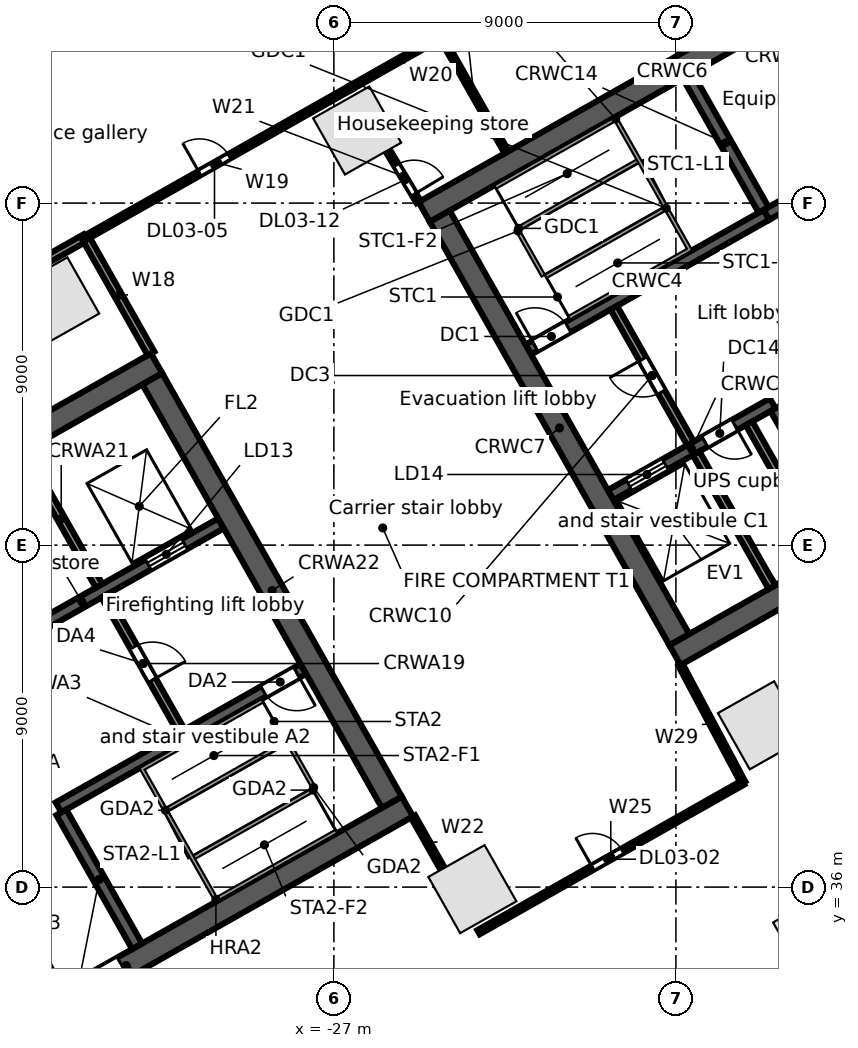
"""IFC4 building model, lengths in metres.
Left out: names, types, materials, properties, quantities, classifications, styles, units other than length and angle.
Written with IfcOpenShell. Run it as: python <this file> out.ifc"""

import sys

from ifc_helpers import new_model, si_unit, direction, frame, frame_2d, origin, origin_2d, place, context, subcontext, project, spatial, rectangle, extrude, element, fill, save


model = new_model("IFC4")
c1 = context("Model", 3, precision=1e-05, world=origin(), true_north=direction((0.0, 1.0)))
c2 = subcontext(c1, "Body", "Model", "MODEL_VIEW")
j1 = project(units=[si_unit("LENGTHUNIT", "METRE"), si_unit("PLANEANGLEUNIT", "RADIAN")], contexts=[c1])
p1 = place(None, origin())
s1 = spatial("IfcSite", under=j1, at=p1, CompositionType="ELEMENT")
p2 = place(p1, origin())
s2 = spatial("IfcBuilding", under=s1, at=p2, CompositionType="ELEMENT")
p3 = place(p2, frame((0.0, 0.0, 21.5)))
s3 = spatial("IfcBuildingStorey", under=s2, at=p3, CompositionType="ELEMENT", Elevation=21.5)
for number, where, z_axis, x_axis in (
    (1, (-26.388, 55.91, 0.0), (0.0, 0.0, 1.0), (-0.87, -0.492, 0.0)),
    (2, (-34.334, 51.414, 0.0), (0.0, 0.0, 1.0), (-0.87, -0.492, 0.0)),
    (3, (-23.356, 35.946, 0.0), (0.0, 0.0, 1.0), (0.87, 0.492, 0.0)),
    (4, (-15.736, 40.257, 0.0), (0.0, 0.0, 1.0), (0.87, 0.492, 0.0)),
):
    element("IfcColumn", number, at=place(p3, frame(where, z_axis=z_axis, x_axis=x_axis)), inside=s3, PredefinedType="COLUMN", context=c2, shape_type="SweptSolid", body=[
        extrude(rectangle(XDim=1.7, YDim=1.7, at=origin_2d()), origin(), (0.0, 0.0, 1.0), 5.0),
    ])
p4 = place(p3, frame((-14.761, 34.88, 0.0), z_axis=(0.0, 0.0, 1.0), x_axis=(0.87035569594, 0.492423560103, 0.0)))
e5 = element("IfcColumn", 5, at=p4, inside=s3, PredefinedType="COLUMN", context=c2, shape_type="SweptSolid", body=[
    extrude(rectangle(XDim=1.0, YDim=1.0, at=origin_2d()), origin(), (0.0, 0.0, 1.0), 4.68),
])
p5 = place(p3, frame((-63.707, 41.701, 0.0), z_axis=(0.0, 0.0, 1.0), x_axis=(0.870355510268, 0.492423888277, 0.0)))
e6 = element("IfcWall", 6, at=p5, inside=s3, PredefinedType="STANDARD", context=c2, shape_type="SweptSolid", body=[
    extrude(rectangle(XDim=67.903, YDim=0.3, at=frame_2d((33.952, 0.0))), origin(), (0.0, 0.0, 1.0), 4.68),
])
p6 = place(p3, frame((-39.862, 29.749, 0.0), z_axis=(0.0, 0.0, 1.0), x_axis=(0.870350116061, 0.492433422375, 0.0)))
e7 = element("IfcWall", 7, at=p6, inside=s3, PredefinedType="SOLIDWALL", context=c2, shape_type="SweptSolid", body=[
    extrude(rectangle(XDim=17.0, YDim=0.6, at=frame_2d((8.5, 0.0))), origin(), (0.0, 0.0, 1.0), 4.68),
])
p7 = place(p6, frame((7.2, 0.0, 0.0)))
e8 = element("IfcOpeningElement", 8, at=p7, cuts=e7, PredefinedType="OPENING", context=c2, shape_type="SweptSolid", body=[
    extrude(rectangle(XDim=1.2, YDim=2.1, at=frame_2d((0.6, 1.05))), frame((0.0, 0.31, 0.0), z_axis=(0.0, -1.0, 0.0), x_axis=(1.0, 0.0, 0.0)), (0.0, 0.0, 1.0), 0.62),
])
p8 = place(p3, frame((-34.245, 38.097, 0.0), z_axis=(0.0, 0.0, 1.0), x_axis=(0.870364910201, 0.492407273597, 0.0)))
e9 = element("IfcWall", 9, at=p8, inside=s3, PredefinedType="SOLIDWALL", context=c2, shape_type="SweptSolid", body=[
    extrude(rectangle(XDim=7.4, YDim=0.3, at=frame_2d((3.7, 0.0))), origin(), (0.0, 0.0, 1.0), 4.68),
])
p9 = place(p8, frame((6.2, 0.0, 0.0)))
e10 = element("IfcOpeningElement", 10, at=p9, cuts=e9, PredefinedType="OPENING", context=c2, shape_type="SweptSolid", body=[
    extrude(rectangle(XDim=1.0, YDim=2.1, at=frame_2d((0.5, 1.05))), frame((0.0, 0.16, 0.0), z_axis=(0.0, -1.0, 0.0), x_axis=(1.0, 0.0, 0.0)), (0.0, 0.0, 1.0), 0.32),
])
p10 = place(p3, frame((-37.282, 41.435, 0.0), z_axis=(0.0, 0.0, 1.0), x_axis=(0.870356516133, 0.492422110414, 0.0)))
e11 = element("IfcWall", 11, at=p10, inside=s3, PredefinedType="SOLIDWALL", context=c2, shape_type="SweptSolid", body=[
    extrude(rectangle(XDim=8.4, YDim=0.3, at=frame_2d((4.2, 0.0))), origin(), (0.0, 0.0, 1.0), 4.68),
])
p11 = place(p10, frame((6.2, 0.0, 0.0)))
e12 = element("IfcOpeningElement", 12, at=p11, cuts=e11, PredefinedType="OPENING", context=c2, shape_type="SweptSolid", body=[
    extrude(rectangle(XDim=1.1, YDim=2.1, at=frame_2d((0.55, 1.05))), frame((0.0, 0.16, 0.0), z_axis=(0.0, -1.0, 0.0), x_axis=(1.0, 0.0, 0.0)), (0.0, 0.0, 1.0), 0.32),
])
p12 = place(p10, frame((1.95, 0.0, 0.0)))
e13 = element("IfcOpeningElement", 13, at=p12, cuts=e11, PredefinedType="OPENING", context=c2, shape_type="SweptSolid", body=[
    extrude(rectangle(XDim=0.9, YDim=2.1, at=frame_2d((0.45, 1.05))), frame((0.0, 0.16, 0.0), z_axis=(0.0, -1.0, 0.0), x_axis=(1.0, 0.0, 0.0)), (0.0, 0.0, 1.0), 0.32),
])
p13 = place(p3, frame((-46.461, 41.412, 0.0), z_axis=(0.0, 0.0, 1.0), x_axis=(0.870350116061, 0.492433422375, 0.0)))
e14 = element("IfcWall", 14, at=p13, inside=s3, PredefinedType="SOLIDWALL", context=c2, shape_type="SweptSolid", body=[
    extrude(rectangle(XDim=17.0, YDim=0.6, at=frame_2d((8.5, 0.0))), origin(), (0.0, 0.0, 1.0), 4.68),
])
p14 = place(p3, frame((-36.26, 36.785, 0.0), z_axis=(0.0, 0.0, 1.0), x_axis=(0.492440575896, -0.870346068648, 0.0)))
e15 = element("IfcWall", 15, at=p14, inside=s3, PredefinedType="SOLIDWALL", context=c2, shape_type="SweptSolid", body=[
    extrude(rectangle(XDim=4.05, YDim=0.3, at=frame_2d((2.025, 0.0))), origin(), (0.0, 0.0, 1.0), 4.68),
])
p15 = place(p3, frame((-34.171, 37.967, 0.0), z_axis=(0.0, 0.0, 1.0), x_axis=(0.492394910396, -0.870371904542, 0.0)))
e16 = element("IfcWall", 16, at=p15, inside=s3, PredefinedType="SOLIDWALL", context=c2, shape_type="SweptSolid", body=[
    extrude(rectangle(XDim=4.05, YDim=0.3, at=frame_2d((2.025, 0.0))), origin(), (0.0, 0.0, 1.0), 4.68),
])
p16 = place(p3, frame((-33.031, 43.667, 0.0), z_axis=(0.0, 0.0, 1.0), x_axis=(0.492408451753, -0.87036424366, 0.0)))
e17 = element("IfcWall", 17, at=p16, inside=s3, PredefinedType="PARTITIONING", context=c2, shape_type="SweptSolid", body=[
    extrude(rectangle(XDim=4.1, YDim=0.2, at=frame_2d((2.05, 0.0))), origin(), (0.0, 0.0, 1.0), 4.68),
])
p17 = place(p16, frame((1.55, 0.0, 0.0)))
e18 = element("IfcOpeningElement", 18, at=p17, cuts=e17, PredefinedType="OPENING", context=c2, shape_type="SweptSolid", body=[
    extrude(rectangle(XDim=1.0, YDim=2.1, at=frame_2d((0.5, 1.05))), frame((0.0, 0.11, 0.0), z_axis=(0.0, -1.0, 0.0), x_axis=(1.0, 0.0, 0.0)), (0.0, 0.0, 1.0), 0.22),
])
p18 = place(p3, frame((-35.173, 47.454, 0.0), z_axis=(0.0, 0.0, 1.0), x_axis=(0.492440575896, -0.870346068648, 0.0)))
e19 = element("IfcWall", 19, at=p18, inside=s3, PredefinedType="SOLIDWALL", context=c2, shape_type="SweptSolid", body=[
    extrude(rectangle(XDim=4.05, YDim=0.2, at=frame_2d((2.025, 0.0))), origin(), (0.0, 0.0, 1.0), 4.68),
])
p19 = place(p3, frame((-31.778, 49.374, 0.0), z_axis=(0.0, 0.0, 1.0), x_axis=(0.492433046652, -0.870350328641, 0.0)))
e20 = element("IfcWall", 20, at=p19, inside=s3, PredefinedType="SOLIDWALL", context=c2, shape_type="SweptSolid", body=[
    extrude(rectangle(XDim=12.8, YDim=0.6, at=frame_2d((6.4, 0.0))), origin(), (0.0, 0.0, 1.0), 4.68),
])
p20 = place(p3, frame((-18.024, 42.104, 0.0), z_axis=(0.0, 0.0, 1.0), x_axis=(0.870360574057, 0.492414937962, 0.0)))
e21 = element("IfcWall", 21, at=p20, inside=s3, PredefinedType="SOLIDWALL", context=c2, shape_type="SweptSolid", body=[
    extrude(rectangle(XDim=15.0, YDim=0.6, at=frame_2d((7.5, 0.0))), origin(), (0.0, 0.0, 1.0), 4.68),
])
p21 = place(p20, frame((6.1, 0.0, 0.0)))
e22 = element("IfcOpeningElement", 22, at=p21, cuts=e21, PredefinedType="OPENING", context=c2, shape_type="SweptSolid", body=[
    extrude(rectangle(XDim=1.2, YDim=2.1, at=frame_2d((0.6, 1.05))), frame((0.0, 0.31, 0.0), z_axis=(0.0, -1.0, 0.0), x_axis=(1.0, 0.0, 0.0)), (0.0, 0.0, 1.0), 0.62),
])
p22 = place(p3, frame((-19.718, 46.316, 0.0), z_axis=(0.0, 0.0, 1.0), x_axis=(0.870353963862, 0.492426621528, 0.0)))
e23 = element("IfcWall", 23, at=p22, inside=s3, PredefinedType="SOLIDWALL", context=c2, shape_type="SweptSolid", body=[
    extrude(rectangle(XDim=4.9, YDim=0.3, at=frame_2d((2.45, 0.0))), origin(), (0.0, 0.0, 1.0), 4.68),
])
p23 = place(p22, frame((0.55, 0.0, 0.0)))
e24 = element("IfcOpeningElement", 24, at=p23, cuts=e23, PredefinedType="OPENING", context=c2, shape_type="SweptSolid", body=[
    extrude(rectangle(XDim=1.1, YDim=2.1, at=frame_2d((0.55, 1.05))), frame((0.0, 0.16, 0.0), z_axis=(0.0, -1.0, 0.0), x_axis=(1.0, 0.0, 0.0)), (0.0, 0.0, 1.0), 0.32),
])
p24 = place(p22, frame((2.85, 0.0, 0.0)))
e25 = element("IfcOpeningElement", 25, at=p24, cuts=e23, PredefinedType="OPENING", context=c2, shape_type="SweptSolid", body=[
    extrude(rectangle(XDim=0.9, YDim=2.1, at=frame_2d((0.45, 1.05))), frame((0.0, 0.16, 0.0), z_axis=(0.0, -1.0, 0.0), x_axis=(1.0, 0.0, 0.0)), (0.0, 0.0, 1.0), 0.32),
])
p25 = place(p3, frame((-21.885, 50.146, 0.0), z_axis=(0.0, 0.0, 1.0), x_axis=(0.870359411463, 0.492416992881, 0.0)))
e26 = element("IfcWall", 26, at=p25, inside=s3, PredefinedType="SOLIDWALL", context=c2, shape_type="SweptSolid", body=[
    extrude(rectangle(XDim=7.2, YDim=0.3, at=frame_2d((3.6, 0.0))), origin(), (0.0, 0.0, 1.0), 4.68),
])
p26 = place(p25, frame((0.2, 0.0, 0.0)))
e27 = element("IfcOpeningElement", 27, at=p26, cuts=e26, PredefinedType="OPENING", context=c2, shape_type="SweptSolid", body=[
    extrude(rectangle(XDim=1.0, YDim=2.1, at=frame_2d((0.5, 1.05))), frame((0.0, 0.16, 0.0), z_axis=(0.0, -1.0, 0.0), x_axis=(1.0, 0.0, 0.0)), (0.0, 0.0, 1.0), 0.32),
])
p27 = place(p3, frame((-15.618, 53.691, 0.0), z_axis=(0.0, 0.0, 1.0), x_axis=(0.870356769198, 0.492421663121, 0.0)))
e28 = element("IfcWall", 28, at=p27, inside=s3, PredefinedType="SOLIDWALL", context=c2, shape_type="SweptSolid", body=[
    extrude(rectangle(XDim=6.6, YDim=0.3, at=frame_2d((3.3, 0.0))), origin(), (0.0, 0.0, 1.0), 4.68),
])
p28 = place(p27, frame((1.85, 0.0, 0.0)))
e29 = element("IfcOpeningElement", 29, at=p28, cuts=e28, PredefinedType="OPENING", context=c2, shape_type="SweptSolid", body=[
    extrude(rectangle(XDim=0.9, YDim=2.1, at=frame_2d((0.45, 1.05))), frame((0.0, 0.16, 0.0), z_axis=(0.0, -1.0, 0.0), x_axis=(1.0, 0.0, 0.0)), (0.0, 0.0, 1.0), 0.32),
])
p29 = place(p27, frame((5.3, 0.0, 0.0)))
e30 = element("IfcOpeningElement", 30, at=p29, cuts=e28, PredefinedType="OPENING", context=c2, shape_type="SweptSolid", body=[
    extrude(rectangle(XDim=0.9, YDim=2.1, at=frame_2d((0.45, 1.05))), frame((0.0, 0.16, 0.0), z_axis=(0.0, -1.0, 0.0), x_axis=(1.0, 0.0, 0.0)), (0.0, 0.0, 1.0), 0.32),
])
p30 = place(p3, frame((-24.623, 53.767, 0.0), z_axis=(0.0, 0.0, 1.0), x_axis=(0.870356627484, 0.492421913601, 0.0)))
e31 = element("IfcWall", 31, at=p30, inside=s3, PredefinedType="SOLIDWALL", context=c2, shape_type="SweptSolid", body=[
    extrude(rectangle(XDim=15.0, YDim=0.6, at=frame_2d((7.5, 0.0))), origin(), (0.0, 0.0, 1.0), 4.68),
])
p31 = place(p3, frame((-24.214, 53.654, 0.0), z_axis=(0.0, 0.0, 1.0), x_axis=(0.492441221355, -0.870345703448, 0.0)))
e32 = element("IfcWall", 32, at=p31, inside=s3, PredefinedType="SOLIDWALL", context=c2, shape_type="SweptSolid", body=[
    extrude(rectangle(XDim=12.8, YDim=0.6, at=frame_2d((6.4, 0.0))), origin(), (0.0, 0.0, 1.0), 4.68),
])
p32 = place(p3, frame((-17.469, 47.417, 0.0), z_axis=(0.0, 0.0, 1.0), x_axis=(0.492440575896, -0.870346068648, 0.0)))
e33 = element("IfcWall", 33, at=p32, inside=s3, PredefinedType="SOLIDWALL", context=c2, shape_type="SweptSolid", body=[
    extrude(rectangle(XDim=4.05, YDim=0.2, at=frame_2d((2.025, 0.0))), origin(), (0.0, 0.0, 1.0), 4.68),
])
p33 = place(p3, frame((-19.635, 51.246, 0.0), z_axis=(0.0, 0.0, 1.0), x_axis=(0.492408451753, -0.87036424366, 0.0)))
e34 = element("IfcWall", 34, at=p33, inside=s3, PredefinedType="PARTITIONING", context=c2, shape_type="SweptSolid", body=[
    extrude(rectangle(XDim=4.1, YDim=0.2, at=frame_2d((2.05, 0.0))), origin(), (0.0, 0.0, 1.0), 4.68),
])
p34 = place(p33, frame((1.55, 0.0, 0.0)))
e35 = element("IfcOpeningElement", 35, at=p34, cuts=e34, PredefinedType="OPENING", context=c2, shape_type="SweptSolid", body=[
    extrude(rectangle(XDim=1.0, YDim=2.1, at=frame_2d((0.5, 1.05))), frame((0.0, 0.11, 0.0), z_axis=(0.0, -1.0, 0.0), x_axis=(1.0, 0.0, 0.0)), (0.0, 0.0, 1.0), 0.22),
])
p35 = place(p3, frame((-16.076, 48.205, 0.0), z_axis=(0.0, 0.0, 1.0), x_axis=(0.492394910396, -0.870371904542, 0.0)))
e36 = element("IfcWall", 36, at=p35, inside=s3, PredefinedType="SOLIDWALL", context=c2, shape_type="SweptSolid", body=[
    extrude(rectangle(XDim=4.05, YDim=0.2, at=frame_2d((2.025, 0.0))), origin(), (0.0, 0.0, 1.0), 4.68),
])
p36 = place(p3, frame((-15.379, 48.599, 0.0), z_axis=(0.0, 0.0, 1.0), x_axis=(0.492394910396, -0.870371904542, 0.0)))
e37 = element("IfcWall", 37, at=p36, inside=s3, PredefinedType="SOLIDWALL", context=c2, shape_type="SweptSolid", body=[
    extrude(rectangle(XDim=4.05, YDim=0.3, at=frame_2d((2.025, 0.0))), origin(), (0.0, 0.0, 1.0), 4.68),
])
p37 = place(p3, frame((-17.686, 57.347, 0.0), z_axis=(0.0, 0.0, 1.0), x_axis=(0.492420746998, -0.870357287513, 0.0)))
e38 = element("IfcWall", 38, at=p37, inside=s3, PredefinedType="SOLIDWALL", context=c2, shape_type="SweptSolid", body=[
    extrude(rectangle(XDim=4.05, YDim=0.3, at=frame_2d((2.025, 0.0))), origin(), (0.0, 0.0, 1.0), 4.68),
])
p38 = place(p3, frame((-40.934, 48.905, 0.0), z_axis=(0.0, 0.0, 1.0), x_axis=(0.870387854278, 0.492366716102, 0.0)))
e39 = element("IfcWall", 39, at=p38, inside=s3, PredefinedType="PARTITIONING", context=c2, shape_type="SweptSolid", body=[
    extrude(rectangle(XDim=8.5, YDim=0.2, at=frame_2d((4.25, 0.0))), origin(), (0.0, 0.0, 1.0), 4.054),
])
p39 = place(p3, frame((-33.536, 53.09, 0.0), z_axis=(0.0, 0.0, 1.0), x_axis=(0.492521469645, -0.870300294116, 0.0)))
e40 = element("IfcWall", 40, at=p39, inside=s3, PredefinedType="PARTITIONING", context=c2, shape_type="SweptSolid", body=[
    extrude(rectangle(XDim=3.5, YDim=0.2, at=frame_2d((1.75, 0.0))), origin(), (0.0, 0.0, 1.0), 3.96),
])
p40 = place(p3, frame((-33.536, 53.09, 0.0), z_axis=(0.0, 0.0, 1.0), x_axis=(0.870327439455, 0.492473499928, 0.0)))
e41 = element("IfcWall", 41, at=p40, inside=s3, PredefinedType="PARTITIONING", context=c2, shape_type="SweptSolid", body=[
    extrude(rectangle(XDim=8.0, YDim=0.125, at=frame_2d((4.0, 0.0))), origin(), (0.0, 0.0, 1.0), 3.742),
])
p41 = place(p40, frame((3.45, 0.0, 0.0)))
e42 = element("IfcOpeningElement", 42, at=p41, cuts=e41, PredefinedType="OPENING", context=c2, shape_type="SweptSolid", body=[
    extrude(rectangle(XDim=0.9, YDim=2.1, at=frame_2d((0.45, 1.05))), frame((0.0, 0.073, 0.0), z_axis=(0.0, -1.0, 0.0), x_axis=(1.0, 0.0, 0.0)), (0.0, 0.0, 1.0), 0.145),
])
p42 = place(p3, frame((-26.573, 57.03, 0.0), z_axis=(0.0, 0.0, 1.0), x_axis=(0.870344460795, 0.492443417626, 0.0)))
e43 = element("IfcWall", 43, at=p42, inside=s3, PredefinedType="PARTITIONING", context=c2, shape_type="SweptSolid", body=[
    extrude(rectangle(XDim=2.75, YDim=0.125, at=frame_2d((1.375, 0.0))), origin(), (0.0, 0.0, 1.0), 4.68),
])
p43 = place(p3, frame((-25.587, 55.387, 0.0), z_axis=(0.0, 0.0, 1.0), x_axis=(0.514767546849, -0.857329792268, 0.0)))
e44 = element("IfcWall", 44, at=p43, inside=s3, PredefinedType="PARTITIONING", context=c2, shape_type="SweptSolid", body=[
    extrude(rectangle(XDim=1.585, YDim=0.125, at=frame_2d((0.792, 0.0))), origin(), (0.0, 0.0, 1.0), 4.68),
])
p44 = place(p43, frame((0.45, 0.0, 0.0)))
e45 = element("IfcOpeningElement", 45, at=p44, cuts=e44, PredefinedType="OPENING", context=c2, shape_type="SweptSolid", body=[
    extrude(rectangle(XDim=0.9, YDim=2.1, at=frame_2d((0.45, 1.05))), frame((0.0, 0.073, 0.0), z_axis=(0.0, -1.0, 0.0), x_axis=(1.0, 0.0, 0.0)), (0.0, 0.0, 1.0), 0.145),
])
p45 = place(p3, frame((-24.919, 37.859, 0.0), z_axis=(0.0, 0.0, 1.0), x_axis=(0.492366981934, -0.870387703901, 0.0)))
e46 = element("IfcWall", 46, at=p45, inside=s3, PredefinedType="PARTITIONING", context=c2, shape_type="SweptSolid", body=[
    extrude(rectangle(XDim=1.584, YDim=0.125, at=frame_2d((0.792, 0.0))), origin(), (0.0, 0.0, 1.0), 4.68),
])
p46 = place(p3, frame((-24.18, 58.384, 0.0), z_axis=(0.0, 0.0, 1.0), x_axis=(0.492521469645, -0.870300294116, 0.0)))
e47 = element("IfcWall", 47, at=p46, inside=s3, PredefinedType="PARTITIONING", context=c2, shape_type="SweptSolid", body=[
    extrude(rectangle(XDim=3.5, YDim=0.125, at=frame_2d((1.75, 0.0))), origin(), (0.0, 0.0, 1.0), 3.96),
])
p47 = place(p3, frame((-23.195, 34.813, 0.0), z_axis=(0.0, 0.0, 1.0), x_axis=(0.870387155114, 0.492367952057, 0.0)))
e48 = element("IfcWall", 48, at=p47, inside=s3, PredefinedType="PARTITIONING", context=c2, shape_type="SweptSolid", body=[
    extrude(rectangle(XDim=8.0, YDim=0.125, at=frame_2d((4.0, 0.0))), origin(), (0.0, 0.0, 1.0), 4.054),
])
p48 = place(p47, frame((3.45, 0.0, 0.0)))
e49 = element("IfcOpeningElement", 49, at=p48, cuts=e48, PredefinedType="OPENING", context=c2, shape_type="SweptSolid", body=[
    extrude(rectangle(XDim=0.9, YDim=2.1, at=frame_2d((0.45, 1.05))), frame((0.0, 0.073, 0.0), z_axis=(0.0, -1.0, 0.0), x_axis=(1.0, 0.0, 0.0)), (0.0, 0.0, 1.0), 0.145),
])
p49 = place(p3, frame((-17.877, 41.843, 0.0), z_axis=(0.0, 0.0, 1.0), x_axis=(0.469799130562, -0.882773344026, 0.0)))
e50 = element("IfcWall", 50, at=p49, inside=s3, PredefinedType="PARTITIONING", context=c2, shape_type="SweptSolid", body=[
    extrude(rectangle(XDim=3.501, YDim=0.125, at=frame_2d((1.751, 0.0))), origin(), (0.0, 0.0, 1.0), 3.96),
])
p50 = place(p11, origin())
e51 = element("IfcDoor", 51, at=p50, inside=s3, OperationType="DOUBLE_DOOR_SLIDING", PredefinedType="DOOR", context=c2, shape_type="SweptSolid", body=[
    extrude(rectangle(XDim=1.1, YDim=2.1, at=frame_2d((0.55, 1.05))), frame((0.0, 0.025, 0.0), z_axis=(0.0, -1.0, 0.0), x_axis=(1.0, 0.0, 0.0)), (0.0, 0.0, 1.0), 0.05),
])
fill(e12, e51)
p51 = place(p9, frame((1.0, 0.0, 0.0), z_axis=(0.0, 0.0, 1.0), x_axis=(-1.0, 0.0, 0.0)))
e52 = element("IfcDoor", 52, at=p51, inside=s3, OperationType="SINGLE_SWING_LEFT", PredefinedType="DOOR", context=c2, shape_type="SweptSolid", body=[
    extrude(rectangle(XDim=1.0, YDim=2.1, at=frame_2d((0.5, 1.05))), frame((0.0, 0.025, 0.0), z_axis=(0.0, -1.0, 0.0), x_axis=(1.0, 0.0, 0.0)), (0.0, 0.0, 1.0), 0.05),
])
fill(e10, e52)
p52 = place(p17, origin())
e53 = element("IfcDoor", 53, at=p52, inside=s3, OperationType="SINGLE_SWING_RIGHT", PredefinedType="DOOR", context=c2, shape_type="SweptSolid", body=[
    extrude(rectangle(XDim=1.0, YDim=2.1, at=frame_2d((0.5, 1.05))), frame((0.0, 0.025, 0.0), z_axis=(0.0, -1.0, 0.0), x_axis=(1.0, 0.0, 0.0)), (0.0, 0.0, 1.0), 0.05),
])
fill(e18, e53)
p53 = place(p7, frame((1.2, 0.0, 0.0), z_axis=(0.0, 0.0, 1.0), x_axis=(-1.0, 0.0, 0.0)))
e54 = element("IfcDoor", 54, at=p53, inside=s3, OperationType="SINGLE_SWING_RIGHT", PredefinedType="DOOR", context=c2, shape_type="SweptSolid", body=[
    extrude(rectangle(XDim=1.2, YDim=2.1, at=frame_2d((0.6, 1.05))), frame((0.0, 0.025, 0.0), z_axis=(0.0, -1.0, 0.0), x_axis=(1.0, 0.0, 0.0)), (0.0, 0.0, 1.0), 0.05),
])
fill(e8, e54)
p54 = place(p23, origin())
e55 = element("IfcDoor", 55, at=p54, inside=s3, OperationType="DOUBLE_DOOR_SLIDING", PredefinedType="DOOR", context=c2, shape_type="SweptSolid", body=[
    extrude(rectangle(XDim=1.1, YDim=2.1, at=frame_2d((0.55, 1.05))), frame((0.0, 0.025, 0.0), z_axis=(0.0, -1.0, 0.0), x_axis=(1.0, 0.0, 0.0)), (0.0, 0.0, 1.0), 0.05),
])
fill(e24, e55)
p55 = place(p26, origin())
e56 = element("IfcDoor", 56, at=p55, inside=s3, OperationType="SINGLE_SWING_LEFT", PredefinedType="DOOR", context=c2, shape_type="SweptSolid", body=[
    extrude(rectangle(XDim=1.0, YDim=2.1, at=frame_2d((0.5, 1.05))), frame((0.0, 0.025, 0.0), z_axis=(0.0, -1.0, 0.0), x_axis=(1.0, 0.0, 0.0)), (0.0, 0.0, 1.0), 0.05),
])
fill(e27, e56)
p56 = place(p34, frame((1.0, 0.0, 0.0), z_axis=(0.0, 0.0, 1.0), x_axis=(-1.0, 0.0, 0.0)))
e57 = element("IfcDoor", 57, at=p56, inside=s3, OperationType="SINGLE_SWING_RIGHT", PredefinedType="DOOR", context=c2, shape_type="SweptSolid", body=[
    extrude(rectangle(XDim=1.0, YDim=2.1, at=frame_2d((0.5, 1.05))), frame((0.0, 0.025, 0.0), z_axis=(0.0, -1.0, 0.0), x_axis=(1.0, 0.0, 0.0)), (0.0, 0.0, 1.0), 0.05),
])
fill(e35, e57)
p57 = place(p24, frame((0.9, 0.0, 0.0), z_axis=(0.0, 0.0, 1.0), x_axis=(-1.0, 0.0, 0.0)))
e58 = element("IfcDoor", 58, at=p57, inside=s3, OperationType="SINGLE_SWING_LEFT", PredefinedType="DOOR", context=c2, shape_type="SweptSolid", body=[
    extrude(rectangle(XDim=0.9, YDim=2.1, at=frame_2d((0.45, 1.05))), frame((0.0, 0.025, 0.0), z_axis=(0.0, -1.0, 0.0), x_axis=(1.0, 0.0, 0.0)), (0.0, 0.0, 1.0), 0.05),
])
fill(e25, e58)
p58 = place(p48, origin())
e59 = element("IfcDoor", 59, at=p58, inside=s3, OperationType="SINGLE_SWING_LEFT", PredefinedType="DOOR", context=c2, shape_type="SweptSolid", body=[
    extrude(rectangle(XDim=0.9, YDim=2.1, at=frame_2d((0.45, 1.05))), frame((0.0, 0.025, 0.0), z_axis=(0.0, -1.0, 0.0), x_axis=(1.0, 0.0, 0.0)), (0.0, 0.0, 1.0), 0.05),
])
fill(e49, e59)
p59 = place(p41, origin())
e60 = element("IfcDoor", 60, at=p59, inside=s3, OperationType="SINGLE_SWING_LEFT", PredefinedType="DOOR", context=c2, shape_type="SweptSolid", body=[
    extrude(rectangle(XDim=0.9, YDim=2.1, at=frame_2d((0.45, 1.05))), frame((0.0, 0.025, 0.0), z_axis=(0.0, -1.0, 0.0), x_axis=(1.0, 0.0, 0.0)), (0.0, 0.0, 1.0), 0.05),
])
fill(e42, e60)
p60 = place(p44, origin())
e61 = element("IfcDoor", 61, at=p60, inside=s3, OperationType="SINGLE_SWING_RIGHT", PredefinedType="DOOR", context=c2, shape_type="SweptSolid", body=[
    extrude(rectangle(XDim=0.9, YDim=2.1, at=frame_2d((0.45, 1.05))), frame((0.0, 0.025, 0.0), z_axis=(0.0, -1.0, 0.0), x_axis=(1.0, 0.0, 0.0)), (0.0, 0.0, 1.0), 0.05),
])
fill(e45, e61)
save(model, sys.argv[1])
